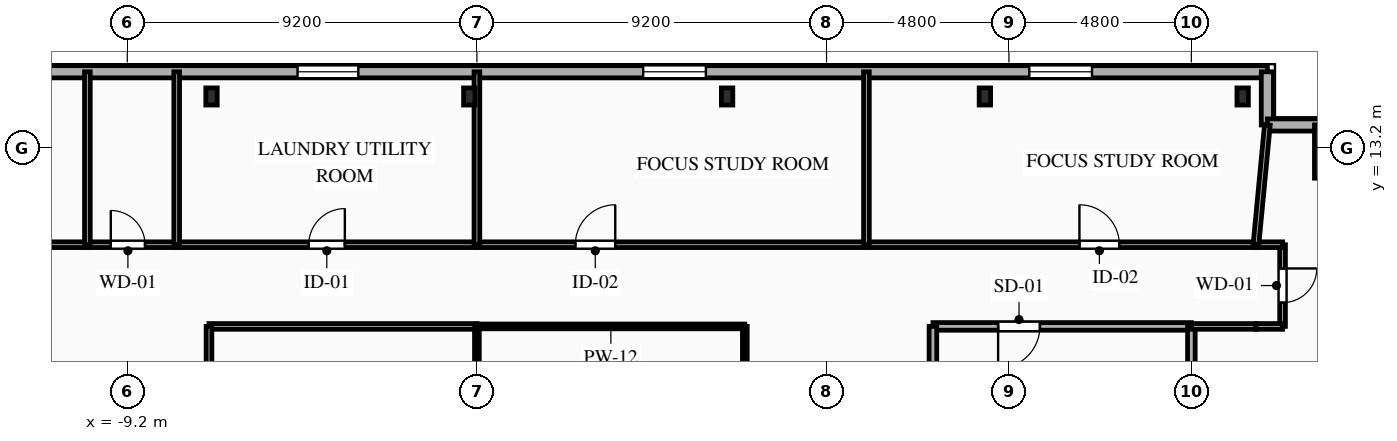
"""IFC4 building model, lengths in metres.
Left out: names, types, materials, properties, quantities, classifications, styles, units other than length and angle.
Written with IfcOpenShell. Run it as: python <this file> out.ifc"""

import sys

from ifc_helpers import new_model, si_unit, direction, frame, frame_2d, origin, origin_2d, place, context, subcontext, project, spatial, rectangle, i_section, extrude, element, fill, save


model = new_model("IFC4")
c1 = context("Model", 3, precision=1e-05, world=origin(), true_north=direction((0.0, 1.0)))
c2 = subcontext(c1, "Body", "Model", "MODEL_VIEW")
j1 = project(units=[si_unit("LENGTHUNIT", "METRE"), si_unit("PLANEANGLEUNIT", "RADIAN")], contexts=[c1])
p1 = place(None, origin())
s1 = spatial("IfcSite", under=j1, at=p1, CompositionType="ELEMENT")
p2 = place(p1, origin())
s2 = spatial("IfcBuilding", under=s1, at=p2, CompositionType="ELEMENT")
p3 = place(p2, frame((0.0, 0.0, 238.35)))
s3 = spatial("IfcBuildingStorey", under=s2, at=p3, CompositionType="ELEMENT", Elevation=238.35)
for number, where, z_axis, x_axis in (
    (1, (20.15, 14.55, 0.0), (0.0, 0.0, 1.0), (1.0, 0.0, 0.0)),
    (2, (13.367, 14.55, 0.0), (0.0, 0.0, 1.0), (1.0, 0.0, 0.0)),
    (3, (6.583, 14.55, 0.0), (0.0, 0.0, 1.0), (1.0, 0.0, 0.0)),
    (4, (-0.2, 14.55, 0.0), (0.0, 0.0, 1.0), (1.0, 0.0, 0.0)),
    (5, (-6.983, 14.55, 0.0), (0.0, 0.0, 1.0), (1.0, 0.0, 0.0)),
):
    element("IfcColumn", number, at=place(p3, frame(where, z_axis=z_axis, x_axis=x_axis)), inside=s3, PredefinedType="COLUMN", context=c2, shape_type="SweptSolid", body=[
        extrude(i_section(OverallWidth=0.3, OverallDepth=0.45, WebThickness=0.014, FlangeThickness=0.026, FilletRadius=0.027, at=origin_2d()), origin(), (0.0, 0.0, 1.0), 3.35),
    ])
p4 = place(p3, frame((-21.2, 15.2, 0.0), z_axis=(0.0, 0.0, 1.0), x_axis=(1.0, 0.0, 0.0)))
e6 = element("IfcWall", 6, at=p4, inside=s3, PredefinedType="SOLIDWALL", context=c2, shape_type="SweptSolid", body=[
    extrude(rectangle(XDim=42.0, YDim=0.32, at=frame_2d((21.0, 0.0))), origin(), (0.0, 0.0, 1.0), 3.04),
])
p5 = place(p4, frame((5.015, 0.0, 0.85)))
e7 = element("IfcOpeningElement", 7, at=p5, cuts=e6, PredefinedType="OPENING", context=c2, shape_type="SweptSolid", body=[
    extrude(rectangle(XDim=1.65, YDim=1.85, at=frame_2d((0.825, 0.925))), frame((0.0, 0.17, 0.0), z_axis=(0.0, -1.0, 0.0), x_axis=(1.0, 0.0, 0.0)), (0.0, 0.0, 1.0), 0.34),
])
p6 = place(p4, frame((16.48, 0.0, 0.85)))
e8 = element("IfcOpeningElement", 8, at=p6, cuts=e6, PredefinedType="OPENING", context=c2, shape_type="SweptSolid", body=[
    extrude(rectangle(XDim=1.6, YDim=1.85, at=frame_2d((0.8, 0.925))), frame((0.0, 0.17, 0.0), z_axis=(0.0, -1.0, 0.0), x_axis=(1.0, 0.0, 0.0)), (0.0, 0.0, 1.0), 0.34),
])
p7 = place(p4, frame((25.575, 0.0, 0.85)))
e9 = element("IfcOpeningElement", 9, at=p7, cuts=e6, PredefinedType="OPENING", context=c2, shape_type="SweptSolid", body=[
    extrude(rectangle(XDim=1.65, YDim=1.85, at=frame_2d((0.825, 0.925))), frame((0.0, 0.17, 0.0), z_axis=(0.0, -1.0, 0.0), x_axis=(1.0, 0.0, 0.0)), (0.0, 0.0, 1.0), 0.34),
])
p8 = place(p4, frame((35.735, 0.0, 0.85)))
e10 = element("IfcOpeningElement", 10, at=p8, cuts=e6, PredefinedType="OPENING", context=c2, shape_type="SweptSolid", body=[
    extrude(rectangle(XDim=1.65, YDim=1.85, at=frame_2d((0.825, 0.925))), frame((0.0, 0.17, 0.0), z_axis=(0.0, -1.0, 0.0), x_axis=(1.0, 0.0, 0.0)), (0.0, 0.0, 1.0), 0.34),
])
for number, where, z_axis, x_axis in (
    (11, (20.8, 15.2, 0.0), (0.0, 0.0, 1.0), (0.0, -1.0, 0.0)),
    (12, (20.8, 13.8, 0.0), (0.0, 0.0, 1.0), (1.0, 0.0, 0.0)),
):
    element("IfcWall", number, at=place(p3, frame(where, z_axis=z_axis, x_axis=x_axis)), inside=s3, PredefinedType="SOLIDWALL", context=c2, shape_type="SweptSolid", body=[
        extrude(rectangle(XDim=1.4, YDim=0.32, at=frame_2d((0.7, 0.0))), origin(), (0.0, 0.0, 1.0), 3.04),
    ])
p9 = place(p3, frame((22.2, 13.8, 0.0), z_axis=(0.0, 0.0, 1.0), x_axis=(0.0, -1.0, 0.0)))
e13 = element("IfcWall", 13, at=p9, inside=s3, PredefinedType="SOLIDWALL", context=c2, shape_type="SweptSolid", body=[
    extrude(rectangle(XDim=1.4, YDim=0.32, at=frame_2d((0.7, 0.0))), origin(), (0.0, 0.0, 1.0), 3.04),
])
p10 = place(p3, frame((18.8, 8.5, 0.0), z_axis=(0.0, 0.0, 1.0), x_axis=(-1.0, 0.0, 0.0)))
e14 = element("IfcWall", 14, at=p10, inside=s3, PredefinedType="PARTITIONING", context=c2, shape_type="SweptSolid", body=[
    extrude(rectangle(XDim=6.8, YDim=0.2, at=frame_2d((3.4, 0.0))), origin(), (0.0, 0.0, 1.0), 3.04),
])
p11 = place(p10, frame((3.985, 0.0, 0.0)))
e15 = element("IfcOpeningElement", 15, at=p11, cuts=e14, PredefinedType="OPENING", context=c2, shape_type="SweptSolid", body=[
    extrude(rectangle(XDim=1.1, YDim=2.15, at=frame_2d((0.55, 1.075))), frame((0.0, 0.11, 0.0), z_axis=(0.0, -1.0, 0.0), x_axis=(1.0, 0.0, 0.0)), (0.0, 0.0, 1.0), 0.22),
])
p12 = place(p3, frame((12.0, 8.5, 0.0), z_axis=(0.0, 0.0, 1.0), x_axis=(0.0, -1.0, 0.0)))
e16 = element("IfcWall", 16, at=p12, inside=s3, PredefinedType="PARTITIONING", context=c2, shape_type="SweptSolid", body=[
    extrude(rectangle(XDim=2.9, YDim=0.2, at=frame_2d((1.45, 0.0))), origin(), (0.0, 0.0, 1.0), 3.04),
])
p13 = place(p3, frame((18.8, 5.6, 0.0), z_axis=(0.0, 0.0, 1.0), x_axis=(0.0, 1.0, 0.0)))
e17 = element("IfcWall", 17, at=p13, inside=s3, PredefinedType="PARTITIONING", context=c2, shape_type="SweptSolid", body=[
    extrude(rectangle(XDim=2.9, YDim=0.2, at=frame_2d((1.45, 0.0))), origin(), (0.0, 0.0, 1.0), 2.665),
])
p14 = place(p3, frame((-20.5, 10.65, 0.0), z_axis=(0.0, 0.0, 1.0), x_axis=(1.0, 0.0, 0.0)))
e18 = element("IfcWall", 18, at=p14, inside=s3, PredefinedType="PARTITIONING", context=c2, shape_type="SweptSolid", body=[
    extrude(rectangle(XDim=10.25, YDim=0.15, at=frame_2d((5.125, 0.0))), origin(), (0.0, 0.0, 1.0), 3.04),
])
p15 = place(p14, frame((2.59, 0.0, 0.0)))
e19 = element("IfcOpeningElement", 19, at=p15, cuts=e18, PredefinedType="OPENING", context=c2, shape_type="SweptSolid", body=[
    extrude(rectangle(XDim=1.05, YDim=2.15, at=frame_2d((0.525, 1.075))), frame((0.0, 0.085, 0.0), z_axis=(0.0, -1.0, 0.0), x_axis=(1.0, 0.0, 0.0)), (0.0, 0.0, 1.0), 0.17),
])
p16 = place(p3, frame((-10.25, 10.65, 0.0), z_axis=(0.0, 0.0, 1.0), x_axis=(1.0, 0.0, 0.0)))
e20 = element("IfcWall", 20, at=p16, inside=s3, PredefinedType="PLUMBINGWALL", context=c2, shape_type="SweptSolid", body=[
    extrude(rectangle(XDim=2.35, YDim=0.15, at=frame_2d((1.175, 0.0))), origin(), (0.0, 0.0, 1.0), 3.04),
])
p17 = place(p16, frame((0.616, 0.0, 0.0)))
e21 = element("IfcOpeningElement", 21, at=p17, cuts=e20, PredefinedType="OPENING", context=c2, shape_type="SweptSolid", body=[
    extrude(rectangle(XDim=0.9, YDim=2.1, at=frame_2d((0.45, 1.05))), frame((0.0, 0.085, 0.0), z_axis=(0.0, -1.0, 0.0), x_axis=(1.0, 0.0, 0.0)), (0.0, 0.0, 1.0), 0.17),
])
p18 = place(p3, frame((-7.9, 10.65, 0.0), z_axis=(0.0, 0.0, 1.0), x_axis=(1.0, 0.0, 0.0)))
e22 = element("IfcWall", 22, at=p18, inside=s3, PredefinedType="PARTITIONING", context=c2, shape_type="SweptSolid", body=[
    extrude(rectangle(XDim=7.9, YDim=0.15, at=frame_2d((3.95, 0.0))), origin(), (0.0, 0.0, 1.0), 3.04),
])
p19 = place(p18, frame((3.475, 0.0, 0.0)))
e23 = element("IfcOpeningElement", 23, at=p19, cuts=e22, PredefinedType="OPENING", context=c2, shape_type="SweptSolid", body=[
    extrude(rectangle(XDim=0.95, YDim=2.1, at=frame_2d((0.475, 1.05))), frame((0.0, 0.085, 0.0), z_axis=(0.0, -1.0, 0.0), x_axis=(1.0, 0.0, 0.0)), (0.0, 0.0, 1.0), 0.17),
])
p20 = place(p3, frame((0.0, 8.5, 0.0), z_axis=(0.0, 0.0, 1.0), x_axis=(-1.0, 0.0, 0.0)))
e24 = element("IfcWall", 24, at=p20, inside=s3, PredefinedType="PARTITIONING", context=c2, shape_type="SweptSolid", body=[
    extrude(rectangle(XDim=7.05, YDim=0.15, at=frame_2d((3.525, 0.0))), origin(), (0.0, 0.0, 1.0), 3.04),
])
p21 = place(p3, frame((21.2, 10.65, 0.0), z_axis=(0.0, 0.0, 1.0), x_axis=(0.0, -1.0, 0.0)))
e25 = element("IfcWall", 25, at=p21, inside=s3, PredefinedType="PARTITIONING", context=c2, shape_type="SweptSolid", body=[
    extrude(rectangle(XDim=2.15, YDim=0.15, at=frame_2d((1.075, 0.0))), origin(), (0.0, 0.0, 1.0), 3.04),
])
p22 = place(p21, frame((0.625, 0.0, 0.0)))
e26 = element("IfcOpeningElement", 26, at=p22, cuts=e25, PredefinedType="OPENING", context=c2, shape_type="SweptSolid", body=[
    extrude(rectangle(XDim=0.9, YDim=2.1, at=frame_2d((0.45, 1.05))), frame((0.0, 0.085, 0.0), z_axis=(0.0, -1.0, 0.0), x_axis=(1.0, 0.0, 0.0)), (0.0, 0.0, 1.0), 0.17),
])
p23 = place(p3, frame((20.5, 8.5, 0.0), z_axis=(0.0, 0.0, 1.0), x_axis=(-1.0, 0.0, 0.0)))
e27 = element("IfcWall", 27, at=p23, inside=s3, PredefinedType="PARTITIONING", context=c2, shape_type="SweptSolid", body=[
    extrude(rectangle(XDim=1.7, YDim=0.15, at=frame_2d((0.85, 0.0))), origin(), (0.0, 0.0, 1.0), 3.04),
])
for number, where, z_axis, x_axis in (
    (28, (20.5, 10.65, 0.0), (0.0, 0.0, 1.0), (1.0, 0.0, 0.0)),
    (29, (21.2, 8.5, 0.0), (0.0, 0.0, 1.0), (-1.0, 0.0, 0.0)),
):
    element("IfcWall", number, at=place(p3, frame(where, z_axis=z_axis, x_axis=x_axis)), inside=s3, PredefinedType="PARTITIONING", context=c2, shape_type="SweptSolid", body=[
        extrude(rectangle(XDim=0.7, YDim=0.15, at=frame_2d((0.35, 0.0))), origin(), (0.0, 0.0, 1.0), 3.04),
    ])
p24 = place(p3, frame((0.0, 10.65, 0.0), z_axis=(0.0, 0.0, 1.0), x_axis=(1.0, 0.0, 0.0)))
e30 = element("IfcWall", 30, at=p24, inside=s3, PredefinedType="PARTITIONING", context=c2, shape_type="SweptSolid", body=[
    extrude(rectangle(XDim=10.25, YDim=0.15, at=frame_2d((5.125, 0.0))), origin(), (0.0, 0.0, 1.0), 3.04),
])
p25 = place(p24, frame((2.59, 0.0, 0.0)))
e31 = element("IfcOpeningElement", 31, at=p25, cuts=e30, PredefinedType="OPENING", context=c2, shape_type="SweptSolid", body=[
    extrude(rectangle(XDim=1.05, YDim=2.15, at=frame_2d((0.525, 1.075))), frame((0.0, 0.085, 0.0), z_axis=(0.0, -1.0, 0.0), x_axis=(1.0, 0.0, 0.0)), (0.0, 0.0, 1.0), 0.17),
])
p26 = place(p3, frame((10.25, 10.65, 0.0), z_axis=(0.0, 0.0, 1.0), x_axis=(1.0, 0.0, 0.0)))
e32 = element("IfcWall", 32, at=p26, inside=s3, PredefinedType="PARTITIONING", context=c2, shape_type="SweptSolid", body=[
    extrude(rectangle(XDim=10.25, YDim=0.15, at=frame_2d((5.125, 0.0))), origin(), (0.0, 0.0, 1.0), 3.04),
])
p27 = place(p26, frame((5.605, 0.0, 0.0)))
e33 = element("IfcOpeningElement", 33, at=p27, cuts=e32, PredefinedType="OPENING", context=c2, shape_type="SweptSolid", body=[
    extrude(rectangle(XDim=1.05, YDim=2.15, at=frame_2d((0.525, 1.075))), frame((0.0, 0.085, 0.0), z_axis=(0.0, -1.0, 0.0), x_axis=(1.0, 0.0, 0.0)), (0.0, 0.0, 1.0), 0.17),
])
p28 = place(p3, frame((7.05, 8.5, 0.0), z_axis=(0.0, 0.0, 1.0), x_axis=(-1.0, 0.0, 0.0)))
e34 = element("IfcWall", 34, at=p28, inside=s3, PredefinedType="PARTITIONING", context=c2, shape_type="SweptSolid", body=[
    extrude(rectangle(XDim=7.05, YDim=0.125, at=frame_2d((3.525, 0.0))), origin(), (0.0, 0.0, 1.0), 3.04),
])
p29 = place(p3, frame((-7.05, 8.5, 0.0), z_axis=(0.0, 0.0, 1.0), x_axis=(0.0, -1.0, 0.0)))
e35 = element("IfcWall", 35, at=p29, inside=s3, PredefinedType="PARTITIONING", context=c2, shape_type="SweptSolid", body=[
    extrude(rectangle(XDim=14.1, YDim=0.15, at=frame_2d((7.05, 0.0))), origin(), (0.0, 0.0, 1.0), 3.04),
])
p30 = place(p29, frame((8.074, 0.0, 0.0)))
e36 = element("IfcOpeningElement", 36, at=p30, cuts=e35, PredefinedType="OPENING", context=c2, shape_type="SweptSolid", body=[
    extrude(rectangle(XDim=0.95, YDim=2.1, at=frame_2d((0.475, 1.05))), frame((0.0, 0.085, 0.0), z_axis=(0.0, -1.0, 0.0), x_axis=(1.0, 0.0, 0.0)), (0.0, 0.0, 1.0), 0.17),
])
p31 = place(p3, frame((7.05, -5.6, 0.0), z_axis=(0.0, 0.0, 1.0), x_axis=(0.0, 1.0, 0.0)))
e37 = element("IfcWall", 37, at=p31, inside=s3, PredefinedType="PARTITIONING", context=c2, shape_type="SweptSolid", body=[
    extrude(rectangle(XDim=14.1, YDim=0.125, at=frame_2d((7.05, 0.0))), origin(), (0.0, 0.0, 1.0), 3.04),
])
p32 = place(p31, frame((5.076, 0.0, 0.0)))
e38 = element("IfcOpeningElement", 38, at=p32, cuts=e37, PredefinedType="OPENING", context=c2, shape_type="SweptSolid", body=[
    extrude(rectangle(XDim=0.95, YDim=2.1, at=frame_2d((0.475, 1.05))), frame((0.0, 0.073, 0.0), z_axis=(0.0, -1.0, 0.0), x_axis=(1.0, 0.0, 0.0)), (0.0, 0.0, 1.0), 0.145),
])
p33 = place(p3, frame((20.5, 10.65, 0.0), z_axis=(0.0, 0.0, 1.0), x_axis=(0.094820015289, 0.99549443228, 0.0)))
e39 = element("IfcWall", 39, at=p33, inside=s3, PredefinedType="PARTITIONING", context=c2, shape_type="SweptSolid", body=[
    extrude(rectangle(XDim=3.164, YDim=0.15, at=frame_2d((1.582, 0.0))), origin(), (0.0, 0.0, 1.0), 3.04),
])
p34 = place(p3, frame((-10.25, 15.2, 0.0), z_axis=(0.0, 0.0, 1.0), x_axis=(0.0, -1.0, 0.0)))
e40 = element("IfcWall", 40, at=p34, inside=s3, PredefinedType="PLUMBINGWALL", context=c2, shape_type="SweptSolid", body=[
    extrude(rectangle(XDim=4.55, YDim=0.15, at=frame_2d((2.275, 0.0))), origin(), (0.0, 0.0, 1.0), 3.04),
])
p35 = place(p3, frame((-7.9, 15.2, 0.0), z_axis=(0.0, 0.0, 1.0), x_axis=(0.0, -1.0, 0.0)))
e41 = element("IfcWall", 41, at=p35, inside=s3, PredefinedType="PLUMBINGWALL", context=c2, shape_type="SweptSolid", body=[
    extrude(rectangle(XDim=4.55, YDim=0.15, at=frame_2d((2.275, 0.0))), origin(), (0.0, 0.0, 1.0), 2.665),
])
for number, where, z_axis, x_axis in (
    (42, (0.0, 15.2, 0.0), (0.0, 0.0, 1.0), (0.0, -1.0, 0.0)),
    (43, (10.25, 15.2, 0.0), (0.0, 0.0, 1.0), (0.0, -1.0, 0.0)),
):
    element("IfcWall", number, at=place(p3, frame(where, z_axis=z_axis, x_axis=x_axis)), inside=s3, PredefinedType="PARTITIONING", context=c2, shape_type="SweptSolid", body=[
        extrude(rectangle(XDim=4.55, YDim=0.15, at=frame_2d((2.275, 0.0))), origin(), (0.0, 0.0, 1.0), 3.04),
    ])
p36 = place(p3, frame((0.0, 8.5, 0.0), z_axis=(0.0, 0.0, 1.0), x_axis=(0.0, -1.0, 0.0)))
e44 = element("IfcWall", 44, at=p36, inside=s3, PredefinedType="PARTITIONING", context=c2, shape_type="SweptSolid", body=[
    extrude(rectangle(XDim=14.1, YDim=0.125, at=frame_2d((7.05, 0.0))), origin(), (0.0, 0.0, 1.0), 3.04),
])
p37 = place(p6, origin())
e45 = element("IfcWindow", 45, at=p37, inside=s3, PartitioningType="SINGLE_PANEL", PredefinedType="WINDOW", context=c2, shape_type="SweptSolid", body=[
    extrude(rectangle(XDim=1.6, YDim=1.85, at=frame_2d((0.8, 0.925))), frame((0.0, 0.03, 0.0), z_axis=(0.0, -1.0, 0.0), x_axis=(1.0, 0.0, 0.0)), (0.0, 0.0, 1.0), 0.06),
])
fill(e8, e45)
p38 = place(p7, origin())
e46 = element("IfcWindow", 46, at=p38, inside=s3, PartitioningType="SINGLE_PANEL", PredefinedType="WINDOW", context=c2, shape_type="SweptSolid", body=[
    extrude(rectangle(XDim=1.65, YDim=1.85, at=frame_2d((0.825, 0.925))), frame((0.0, 0.03, 0.0), z_axis=(0.0, -1.0, 0.0), x_axis=(1.0, 0.0, 0.0)), (0.0, 0.0, 1.0), 0.06),
])
fill(e9, e46)
p39 = place(p8, origin())
e47 = element("IfcWindow", 47, at=p39, inside=s3, PartitioningType="SINGLE_PANEL", PredefinedType="WINDOW", context=c2, shape_type="SweptSolid", body=[
    extrude(rectangle(XDim=1.65, YDim=1.85, at=frame_2d((0.825, 0.925))), frame((0.0, 0.03, 0.0), z_axis=(0.0, -1.0, 0.0), x_axis=(1.0, 0.0, 0.0)), (0.0, 0.0, 1.0), 0.06),
])
fill(e10, e47)
p40 = place(p11, origin())
e48 = element("IfcDoor", 48, at=p40, inside=s3, OperationType="SINGLE_SWING_RIGHT", PredefinedType="DOOR", context=c2, shape_type="SweptSolid", body=[
    extrude(rectangle(XDim=1.1, YDim=2.15, at=frame_2d((0.55, 1.075))), frame((0.0, 0.025, 0.0), z_axis=(0.0, -1.0, 0.0), x_axis=(1.0, 0.0, 0.0)), (0.0, 0.0, 1.0), 0.05),
])
fill(e15, e48)
p41 = place(p17, origin())
e49 = element("IfcDoor", 49, at=p41, inside=s3, OperationType="SINGLE_SWING_LEFT", PredefinedType="DOOR", context=c2, shape_type="SweptSolid", body=[
    extrude(rectangle(XDim=0.9, YDim=2.1, at=frame_2d((0.45, 1.05))), frame((0.0, 0.025, 0.0), z_axis=(0.0, -1.0, 0.0), x_axis=(1.0, 0.0, 0.0)), (0.0, 0.0, 1.0), 0.05),
])
fill(e21, e49)
p42 = place(p19, origin())
e50 = element("IfcDoor", 50, at=p42, inside=s3, OperationType="SINGLE_SWING_RIGHT", PredefinedType="DOOR", context=c2, shape_type="SweptSolid", body=[
    extrude(rectangle(XDim=0.95, YDim=2.1, at=frame_2d((0.475, 1.05))), frame((0.0, 0.025, 0.0), z_axis=(0.0, -1.0, 0.0), x_axis=(1.0, 0.0, 0.0)), (0.0, 0.0, 1.0), 0.05),
])
fill(e23, e50)
p43 = place(p22, origin())
e51 = element("IfcDoor", 51, at=p43, inside=s3, OperationType="SINGLE_SWING_LEFT", PredefinedType="DOOR", context=c2, shape_type="SweptSolid", body=[
    extrude(rectangle(XDim=0.9, YDim=2.1, at=frame_2d((0.45, 1.05))), frame((0.0, 0.025, 0.0), z_axis=(0.0, -1.0, 0.0), x_axis=(1.0, 0.0, 0.0)), (0.0, 0.0, 1.0), 0.05),
])
fill(e26, e51)
p44 = place(p25, origin())
e52 = element("IfcDoor", 52, at=p44, inside=s3, OperationType="SINGLE_SWING_RIGHT", PredefinedType="DOOR", context=c2, shape_type="SweptSolid", body=[
    extrude(rectangle(XDim=1.05, YDim=2.15, at=frame_2d((0.525, 1.075))), frame((0.0, 0.025, 0.0), z_axis=(0.0, -1.0, 0.0), x_axis=(1.0, 0.0, 0.0)), (0.0, 0.0, 1.0), 0.05),
])
fill(e31, e52)
p45 = place(p27, origin())
e53 = element("IfcDoor", 53, at=p45, inside=s3, OperationType="SINGLE_SWING_LEFT", PredefinedType="DOOR", context=c2, shape_type="SweptSolid", body=[
    extrude(rectangle(XDim=1.05, YDim=2.15, at=frame_2d((0.525, 1.075))), frame((0.0, 0.025, 0.0), z_axis=(0.0, -1.0, 0.0), x_axis=(1.0, 0.0, 0.0)), (0.0, 0.0, 1.0), 0.05),
])
fill(e33, e53)
save(model, sys.argv[1])
